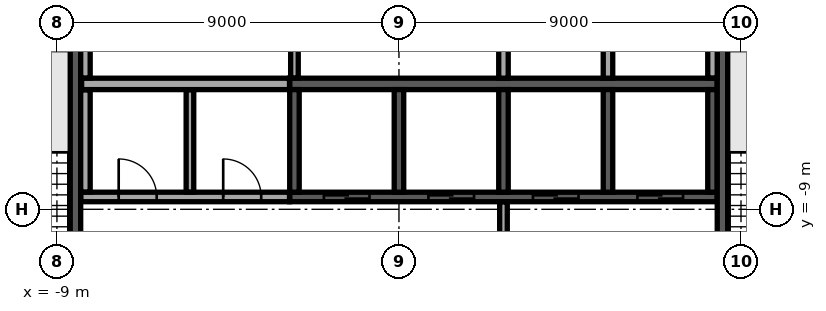
"""IFC4 building model, lengths in metres.
Left out: names, types, materials, properties, quantities, classifications, styles, units other than length and angle.
Written with IfcOpenShell. Run it as: python <this file> out.ifc"""

import sys

from ifc_helpers import new_model, si_unit, direction, frame, frame_2d, origin, place, context, subcontext, project, spatial, rectangle, extrude, element, fill, save


model = new_model("IFC4")
c1 = context("Model", 3, precision=1e-05, world=origin(), true_north=direction((0.0, 1.0)))
c2 = subcontext(c1, "Body", "Model", "MODEL_VIEW")
j1 = project(units=[si_unit("LENGTHUNIT", "METRE"), si_unit("PLANEANGLEUNIT", "RADIAN")], contexts=[c1])
p1 = place(None, origin())
s1 = spatial("IfcSite", under=j1, at=p1, CompositionType="ELEMENT")
p2 = place(p1, origin())
s2 = spatial("IfcBuilding", under=s1, at=p2, CompositionType="ELEMENT")
p3 = place(p2, frame((0.0, 0.0, 254.9)))
s3 = spatial("IfcBuildingStorey", under=s2, at=p3, CompositionType="ELEMENT", Elevation=254.9)
p4 = place(p3, frame((-2.875, -5.7, 0.0), z_axis=(0.0, 0.0, 1.0), x_axis=(1.0, 0.0, 0.0)))
e1 = element("IfcWall", 1, at=p4, inside=s3, PredefinedType="SOLIDWALL", context=c2, shape_type="SweptSolid", body=[
    extrude(rectangle(XDim=11.25, YDim=0.3, at=frame_2d((5.625, 0.0))), origin(), (0.0, 0.0, 1.0), 3.64),
])
for number, where, z_axis, x_axis in (
    (2, (2.75, -5.55, 0.0), (0.0, 0.0, 1.0), (0.0, 1.0, 0.0)),
    (3, (5.5, -5.55, 0.0), (0.0, 0.0, 1.0), (0.0, 1.0, 0.0)),
):
    element("IfcWall", number, at=place(p3, frame(where, z_axis=z_axis, x_axis=x_axis)), inside=s3, PredefinedType="SOLIDWALL", context=c2, shape_type="SweptSolid", body=[
        extrude(rectangle(XDim=2.7, YDim=0.25, at=frame_2d((1.35, 0.0))), origin(), (0.0, 0.0, 1.0), 3.64),
    ])
p5 = place(p3, frame((-2.875, -8.675, 0.0), z_axis=(0.0, 0.0, 1.0), x_axis=(1.0, 0.0, 0.0)))
e4 = element("IfcWall", 4, at=p5, inside=s3, PredefinedType="SOLIDWALL", context=c2, shape_type="SweptSolid", body=[
    extrude(rectangle(XDim=11.25, YDim=0.25, at=frame_2d((5.625, 0.0))), origin(), (0.0, 0.0, 1.0), 3.64),
])
p6 = place(p5, frame((0.9, 0.0, 0.0)))
e5 = element("IfcOpeningElement", 5, at=p6, cuts=e4, PredefinedType="OPENING", context=c2, shape_type="SweptSolid", body=[
    extrude(rectangle(XDim=1.2, YDim=2.1, at=frame_2d((0.6, 1.05))), frame((0.0, 0.135, 0.0), z_axis=(0.0, -1.0, 0.0), x_axis=(1.0, 0.0, 0.0)), (0.0, 0.0, 1.0), 0.27),
])
p7 = place(p5, frame((3.65, 0.0, 0.0)))
e6 = element("IfcOpeningElement", 6, at=p7, cuts=e4, PredefinedType="OPENING", context=c2, shape_type="SweptSolid", body=[
    extrude(rectangle(XDim=1.2, YDim=2.1, at=frame_2d((0.6, 1.05))), frame((0.0, 0.135, 0.0), z_axis=(0.0, -1.0, 0.0), x_axis=(1.0, 0.0, 0.0)), (0.0, 0.0, 1.0), 0.27),
])
p8 = place(p5, frame((6.4, 0.0, 0.0)))
e7 = element("IfcOpeningElement", 7, at=p8, cuts=e4, PredefinedType="OPENING", context=c2, shape_type="SweptSolid", body=[
    extrude(rectangle(XDim=1.2, YDim=2.1, at=frame_2d((0.6, 1.05))), frame((0.0, 0.135, 0.0), z_axis=(0.0, -1.0, 0.0), x_axis=(1.0, 0.0, 0.0)), (0.0, 0.0, 1.0), 0.27),
])
p9 = place(p5, frame((9.15, 0.0, 0.0)))
e8 = element("IfcOpeningElement", 8, at=p9, cuts=e4, PredefinedType="OPENING", context=c2, shape_type="SweptSolid", body=[
    extrude(rectangle(XDim=1.2, YDim=2.1, at=frame_2d((0.6, 1.05))), frame((0.0, 0.135, 0.0), z_axis=(0.0, -1.0, 0.0), x_axis=(1.0, 0.0, 0.0)), (0.0, 0.0, 1.0), 0.27),
])
for number, where, z_axis, x_axis in (
    (9, (-2.75, -8.55, 0.0), (0.0, 0.0, 1.0), (0.0, 1.0, 0.0)),
    (10, (0.0, -8.55, 0.0), (0.0, 0.0, 1.0), (0.0, 1.0, 0.0)),
    (11, (2.75, -8.55, 0.0), (0.0, 0.0, 1.0), (0.0, 1.0, 0.0)),
    (12, (5.5, -8.55, 0.0), (0.0, 0.0, 1.0), (0.0, 1.0, 0.0)),
    (13, (8.25, -8.55, 0.0), (0.0, 0.0, 1.0), (0.0, 1.0, 0.0)),
):
    element("IfcWall", number, at=place(p3, frame(where, z_axis=z_axis, x_axis=x_axis)), inside=s3, PredefinedType="SOLIDWALL", context=c2, shape_type="SweptSolid", body=[
        extrude(rectangle(XDim=2.7, YDim=0.25, at=frame_2d((1.35, 0.0))), origin(), (0.0, 0.0, 1.0), 3.64),
    ])
p10 = place(p3, frame((-8.512, -4.55, 0.0), z_axis=(0.0, 0.0, 1.0), x_axis=(0.0, -1.0, 0.0)))
e14 = element("IfcWall", 14, at=p10, inside=s3, PredefinedType="SOLIDWALL", context=c2, shape_type="SweptSolid", body=[
    extrude(rectangle(XDim=7.25, YDim=0.275, at=frame_2d((3.625, 0.0))), origin(), (0.0, 0.0, 1.0), 3.64),
])
p11 = place(p10, frame((6.0, 0.0, 0.0)))
e15 = element("IfcOpeningElement", 15, at=p11, cuts=e14, PredefinedType="OPENING", context=c2, shape_type="SweptSolid", body=[
    extrude(rectangle(XDim=1.0, YDim=2.1, at=frame_2d((0.5, 1.05))), frame((0.0, 0.147, 0.0), z_axis=(0.0, -1.0, 0.0), x_axis=(1.0, 0.0, 0.0)), (0.0, 0.0, 1.0), 0.295),
])
p12 = place(p3, frame((8.512, -4.55, 0.0), z_axis=(0.0, 0.0, 1.0), x_axis=(0.0, -1.0, 0.0)))
e16 = element("IfcWall", 16, at=p12, inside=s3, PredefinedType="SOLIDWALL", context=c2, shape_type="SweptSolid", body=[
    extrude(rectangle(XDim=7.25, YDim=0.275, at=frame_2d((3.625, 0.0))), origin(), (0.0, 0.0, 1.0), 3.64),
])
p13 = place(p12, frame((6.0, 0.0, 0.0)))
e17 = element("IfcOpeningElement", 17, at=p13, cuts=e16, PredefinedType="OPENING", context=c2, shape_type="SweptSolid", body=[
    extrude(rectangle(XDim=1.0, YDim=2.1, at=frame_2d((0.5, 1.05))), frame((0.0, 0.147, 0.0), z_axis=(0.0, -1.0, 0.0), x_axis=(1.0, 0.0, 0.0)), (0.0, 0.0, 1.0), 0.295),
])
p14 = place(p3, frame((2.75, -11.795, 0.0), z_axis=(0.0, 0.0, 1.0), x_axis=(0.0, 1.0, 0.0)))
e18 = element("IfcWall", 18, at=p14, inside=s3, PredefinedType="PARTITIONING", context=c2, shape_type="SweptSolid", body=[
    extrude(rectangle(XDim=2.99, YDim=0.2, at=frame_2d((1.495, 0.0))), origin(), (0.0, 0.0, 1.0), 3.64),
])
p15 = place(p3, frame((-8.37, -8.675, 0.0), z_axis=(0.0, 0.0, 1.0), x_axis=(1.0, 0.0, 0.0)))
e19 = element("IfcWall", 19, at=p15, inside=s3, PredefinedType="PARTITIONING", context=c2, shape_type="SweptSolid", body=[
    extrude(rectangle(XDim=5.49, YDim=0.25, at=frame_2d((2.745, 0.0))), origin(), (0.0, 0.0, 1.0), 3.64),
])
p16 = place(p15, frame((0.995, 0.0, 0.0)))
e20 = element("IfcOpeningElement", 20, at=p16, cuts=e19, PredefinedType="OPENING", context=c2, shape_type="SweptSolid", body=[
    extrude(rectangle(XDim=1.0, YDim=2.1, at=frame_2d((0.5, 1.05))), frame((0.0, 0.135, 0.0), z_axis=(0.0, -1.0, 0.0), x_axis=(1.0, 0.0, 0.0)), (0.0, 0.0, 1.0), 0.27),
])
p17 = place(p15, frame((3.745, 0.0, 0.0)))
e21 = element("IfcOpeningElement", 21, at=p17, cuts=e19, PredefinedType="OPENING", context=c2, shape_type="SweptSolid", body=[
    extrude(rectangle(XDim=1.0, YDim=2.1, at=frame_2d((0.5, 1.05))), frame((0.0, 0.135, 0.0), z_axis=(0.0, -1.0, 0.0), x_axis=(1.0, 0.0, 0.0)), (0.0, 0.0, 1.0), 0.27),
])
p18 = place(p3, frame((-8.25, -8.545, 0.0), z_axis=(0.0, 0.0, 1.0), x_axis=(0.0, 1.0, 0.0)))
e22 = element("IfcWall", 22, at=p18, inside=s3, PredefinedType="PARTITIONING", context=c2, shape_type="SweptSolid", body=[
    extrude(rectangle(XDim=2.69, YDim=0.25, at=frame_2d((1.345, 0.0))), origin(), (0.0, 0.0, 1.0), 3.64),
])
p19 = place(p3, frame((-5.5, -8.545, 0.0), z_axis=(0.0, 0.0, 1.0), x_axis=(0.0, 1.0, 0.0)))
e23 = element("IfcWall", 23, at=p19, inside=s3, PredefinedType="PARTITIONING", context=c2, shape_type="SweptSolid", body=[
    extrude(rectangle(XDim=2.69, YDim=0.2, at=frame_2d((1.345, 0.0))), origin(), (0.0, 0.0, 1.0), 3.64),
])
p20 = place(p3, frame((-8.35, -5.7, 0.0), z_axis=(0.0, 0.0, 1.0), x_axis=(1.0, 0.0, 0.0)))
e24 = element("IfcWall", 24, at=p20, inside=s3, PredefinedType="PARTITIONING", context=c2, shape_type="SweptSolid", body=[
    extrude(rectangle(XDim=5.47, YDim=0.3, at=frame_2d((2.735, 0.0))), origin(), (0.0, 0.0, 1.0), 3.64),
])
p21 = place(p3, frame((-8.25, -5.545, 0.0), z_axis=(0.0, 0.0, 1.0), x_axis=(0.0, 1.0, 0.0)))
e25 = element("IfcWall", 25, at=p21, inside=s3, PredefinedType="PARTITIONING", context=c2, shape_type="SweptSolid", body=[
    extrude(rectangle(XDim=2.69, YDim=0.25, at=frame_2d((1.345, 0.0))), origin(), (0.0, 0.0, 1.0), 3.64),
])
p22 = place(p3, frame((-2.75, -5.545, 0.0), z_axis=(0.0, 0.0, 1.0), x_axis=(0.0, 1.0, 0.0)))
e26 = element("IfcWall", 26, at=p22, inside=s3, PredefinedType="PARTITIONING", context=c2, shape_type="SweptSolid", body=[
    extrude(rectangle(XDim=2.69, YDim=0.2, at=frame_2d((1.345, 0.0))), origin(), (0.0, 0.0, 1.0), 3.64),
])
p23 = place(p3, frame((8.25, -5.545, 0.0), z_axis=(0.0, 0.0, 1.0), x_axis=(0.0, 1.0, 0.0)))
e27 = element("IfcWall", 27, at=p23, inside=s3, PredefinedType="PARTITIONING", context=c2, shape_type="SweptSolid", body=[
    extrude(rectangle(XDim=2.69, YDim=0.25, at=frame_2d((1.345, 0.0))), origin(), (0.0, 0.0, 1.0), 3.64),
])
p24 = place(p3, frame((-6.281, 33.292, 0.0), z_axis=(0.0, 0.0, 1.0), x_axis=(-0.544637268583, -0.838671715077, 0.0)))
e28 = element("IfcWall", 28, at=p24, inside=s3, PredefinedType="STANDARD", context=c2, shape_type="SweptSolid", body=[
    extrude(rectangle(XDim=48.843, YDim=0.6, at=frame_2d((24.422, 0.0))), origin(), (0.0, 0.0, 1.0), 3.64),
])
p25 = place(p24, frame((1.22, 0.0, 0.9)))
e29 = element("IfcOpeningElement", 29, at=p25, cuts=e28, PredefinedType="OPENING", context=c2, shape_type="SweptSolid", body=[
    extrude(rectangle(XDim=2.0, YDim=2.1, at=frame_2d((1.0, 1.05))), frame((0.0, 0.31, 0.0), z_axis=(0.0, -1.0, 0.0), x_axis=(1.0, 0.0, 0.0)), (0.0, 0.0, 1.0), 0.62),
])
p26 = place(p24, frame((5.66, 0.0, 0.9)))
e30 = element("IfcOpeningElement", 30, at=p26, cuts=e28, PredefinedType="OPENING", context=c2, shape_type="SweptSolid", body=[
    extrude(rectangle(XDim=2.0, YDim=2.1, at=frame_2d((1.0, 1.05))), frame((0.0, 0.31, 0.0), z_axis=(0.0, -1.0, 0.0), x_axis=(1.0, 0.0, 0.0)), (0.0, 0.0, 1.0), 0.62),
])
p27 = place(p24, frame((14.541, 0.0, 0.9)))
e31 = element("IfcOpeningElement", 31, at=p27, cuts=e28, PredefinedType="OPENING", context=c2, shape_type="SweptSolid", body=[
    extrude(rectangle(XDim=2.0, YDim=2.1, at=frame_2d((1.0, 1.05))), frame((0.0, 0.31, 0.0), z_axis=(0.0, -1.0, 0.0), x_axis=(1.0, 0.0, 0.0)), (0.0, 0.0, 1.0), 0.62),
])
p28 = place(p24, frame((18.981, 0.0, 0.9)))
e32 = element("IfcOpeningElement", 32, at=p28, cuts=e28, PredefinedType="OPENING", context=c2, shape_type="SweptSolid", body=[
    extrude(rectangle(XDim=2.0, YDim=2.1, at=frame_2d((1.0, 1.05))), frame((0.0, 0.31, 0.0), z_axis=(0.0, -1.0, 0.0), x_axis=(1.0, 0.0, 0.0)), (0.0, 0.0, 1.0), 0.62),
])
p29 = place(p24, frame((23.422, 0.0, 0.9)))
e33 = element("IfcOpeningElement", 33, at=p29, cuts=e28, PredefinedType="OPENING", context=c2, shape_type="SweptSolid", body=[
    extrude(rectangle(XDim=2.0, YDim=2.1, at=frame_2d((1.0, 1.05))), frame((0.0, 0.31, 0.0), z_axis=(0.0, -1.0, 0.0), x_axis=(1.0, 0.0, 0.0)), (0.0, 0.0, 1.0), 0.62),
])
p30 = place(p24, frame((27.862, 0.0, 0.9)))
e34 = element("IfcOpeningElement", 34, at=p30, cuts=e28, PredefinedType="OPENING", context=c2, shape_type="SweptSolid", body=[
    extrude(rectangle(XDim=2.0, YDim=2.1, at=frame_2d((1.0, 1.05))), frame((0.0, 0.31, 0.0), z_axis=(0.0, -1.0, 0.0), x_axis=(1.0, 0.0, 0.0)), (0.0, 0.0, 1.0), 0.62),
])
p31 = place(p24, frame((32.302, 0.0, 0.9)))
e35 = element("IfcOpeningElement", 35, at=p31, cuts=e28, PredefinedType="OPENING", context=c2, shape_type="SweptSolid", body=[
    extrude(rectangle(XDim=2.0, YDim=2.1, at=frame_2d((1.0, 1.05))), frame((0.0, 0.31, 0.0), z_axis=(0.0, -1.0, 0.0), x_axis=(1.0, 0.0, 0.0)), (0.0, 0.0, 1.0), 0.62),
])
p32 = place(p24, frame((36.742, 0.0, 0.9)))
e36 = element("IfcOpeningElement", 36, at=p32, cuts=e28, PredefinedType="OPENING", context=c2, shape_type="SweptSolid", body=[
    extrude(rectangle(XDim=2.0, YDim=2.1, at=frame_2d((1.0, 1.05))), frame((0.0, 0.31, 0.0), z_axis=(0.0, -1.0, 0.0), x_axis=(1.0, 0.0, 0.0)), (0.0, 0.0, 1.0), 0.62),
])
p33 = place(p24, frame((41.183, 0.0, 0.9)))
e37 = element("IfcOpeningElement", 37, at=p33, cuts=e28, PredefinedType="OPENING", context=c2, shape_type="SweptSolid", body=[
    extrude(rectangle(XDim=2.0, YDim=2.1, at=frame_2d((1.0, 1.05))), frame((0.0, 0.31, 0.0), z_axis=(0.0, -1.0, 0.0), x_axis=(1.0, 0.0, 0.0)), (0.0, 0.0, 1.0), 0.62),
])
p34 = place(p24, frame((45.623, 0.0, 0.9)))
e38 = element("IfcOpeningElement", 38, at=p34, cuts=e28, PredefinedType="OPENING", context=c2, shape_type="SweptSolid", body=[
    extrude(rectangle(XDim=2.0, YDim=2.1, at=frame_2d((1.0, 1.05))), frame((0.0, 0.31, 0.0), z_axis=(0.0, -1.0, 0.0), x_axis=(1.0, 0.0, 0.0)), (0.0, 0.0, 1.0), 0.62),
])
p35 = place(p3, frame((6.367, -33.16, 0.0), z_axis=(0.0, 0.0, 1.0), x_axis=(0.544637371147, 0.838671648472, 0.0)))
e39 = element("IfcWall", 39, at=p35, inside=s3, PredefinedType="STANDARD", context=c2, shape_type="SweptSolid", body=[
    extrude(rectangle(XDim=48.686, YDim=0.6, at=frame_2d((24.343, 0.0))), origin(), (0.0, 0.0, 1.0), 3.64),
])
p36 = place(p35, frame((1.213, 0.0, 0.9)))
e40 = element("IfcOpeningElement", 40, at=p36, cuts=e39, PredefinedType="OPENING", context=c2, shape_type="SweptSolid", body=[
    extrude(rectangle(XDim=2.0, YDim=2.1, at=frame_2d((1.0, 1.05))), frame((0.0, 0.31, 0.0), z_axis=(0.0, -1.0, 0.0), x_axis=(1.0, 0.0, 0.0)), (0.0, 0.0, 1.0), 0.62),
])
p37 = place(p35, frame((5.639, 0.0, 0.9)))
e41 = element("IfcOpeningElement", 41, at=p37, cuts=e39, PredefinedType="OPENING", context=c2, shape_type="SweptSolid", body=[
    extrude(rectangle(XDim=2.0, YDim=2.1, at=frame_2d((1.0, 1.05))), frame((0.0, 0.31, 0.0), z_axis=(0.0, -1.0, 0.0), x_axis=(1.0, 0.0, 0.0)), (0.0, 0.0, 1.0), 0.62),
])
p38 = place(p35, frame((14.491, 0.0, 0.9)))
e42 = element("IfcOpeningElement", 42, at=p38, cuts=e39, PredefinedType="OPENING", context=c2, shape_type="SweptSolid", body=[
    extrude(rectangle(XDim=2.0, YDim=2.1, at=frame_2d((1.0, 1.05))), frame((0.0, 0.31, 0.0), z_axis=(0.0, -1.0, 0.0), x_axis=(1.0, 0.0, 0.0)), (0.0, 0.0, 1.0), 0.62),
])
p39 = place(p35, frame((18.917, 0.0, 0.9)))
e43 = element("IfcOpeningElement", 43, at=p39, cuts=e39, PredefinedType="OPENING", context=c2, shape_type="SweptSolid", body=[
    extrude(rectangle(XDim=2.0, YDim=2.1, at=frame_2d((1.0, 1.05))), frame((0.0, 0.31, 0.0), z_axis=(0.0, -1.0, 0.0), x_axis=(1.0, 0.0, 0.0)), (0.0, 0.0, 1.0), 0.62),
])
p40 = place(p35, frame((23.343, 0.0, 0.9)))
e44 = element("IfcOpeningElement", 44, at=p40, cuts=e39, PredefinedType="OPENING", context=c2, shape_type="SweptSolid", body=[
    extrude(rectangle(XDim=2.0, YDim=2.1, at=frame_2d((1.0, 1.05))), frame((0.0, 0.31, 0.0), z_axis=(0.0, -1.0, 0.0), x_axis=(1.0, 0.0, 0.0)), (0.0, 0.0, 1.0), 0.62),
])
p41 = place(p35, frame((27.769, 0.0, 0.9)))
e45 = element("IfcOpeningElement", 45, at=p41, cuts=e39, PredefinedType="OPENING", context=c2, shape_type="SweptSolid", body=[
    extrude(rectangle(XDim=2.0, YDim=2.1, at=frame_2d((1.0, 1.05))), frame((0.0, 0.31, 0.0), z_axis=(0.0, -1.0, 0.0), x_axis=(1.0, 0.0, 0.0)), (0.0, 0.0, 1.0), 0.62),
])
p42 = place(p35, frame((32.195, 0.0, 0.9)))
e46 = element("IfcOpeningElement", 46, at=p42, cuts=e39, PredefinedType="OPENING", context=c2, shape_type="SweptSolid", body=[
    extrude(rectangle(XDim=2.0, YDim=2.1, at=frame_2d((1.0, 1.05))), frame((0.0, 0.31, 0.0), z_axis=(0.0, -1.0, 0.0), x_axis=(1.0, 0.0, 0.0)), (0.0, 0.0, 1.0), 0.62),
])
p43 = place(p35, frame((36.621, 0.0, 0.9)))
e47 = element("IfcOpeningElement", 47, at=p43, cuts=e39, PredefinedType="OPENING", context=c2, shape_type="SweptSolid", body=[
    extrude(rectangle(XDim=2.0, YDim=2.1, at=frame_2d((1.0, 1.05))), frame((0.0, 0.31, 0.0), z_axis=(0.0, -1.0, 0.0), x_axis=(1.0, 0.0, 0.0)), (0.0, 0.0, 1.0), 0.62),
])
p44 = place(p35, frame((41.047, 0.0, 0.9)))
e48 = element("IfcOpeningElement", 48, at=p44, cuts=e39, PredefinedType="OPENING", context=c2, shape_type="SweptSolid", body=[
    extrude(rectangle(XDim=2.0, YDim=2.1, at=frame_2d((1.0, 1.05))), frame((0.0, 0.31, 0.0), z_axis=(0.0, -1.0, 0.0), x_axis=(1.0, 0.0, 0.0)), (0.0, 0.0, 1.0), 0.62),
])
p45 = place(p35, frame((45.473, 0.0, 0.9)))
e49 = element("IfcOpeningElement", 49, at=p45, cuts=e39, PredefinedType="OPENING", context=c2, shape_type="SweptSolid", body=[
    extrude(rectangle(XDim=2.0, YDim=2.1, at=frame_2d((1.0, 1.05))), frame((0.0, 0.31, 0.0), z_axis=(0.0, -1.0, 0.0), x_axis=(1.0, 0.0, 0.0)), (0.0, 0.0, 1.0), 0.62),
])
p46 = place(p3, frame((-26.791, -5.221, 0.0), z_axis=(0.0, 0.0, 1.0), x_axis=(0.838671905754, -0.544636974965, 0.0)))
e50 = element("IfcWall", 50, at=p46, inside=s3, PredefinedType="PARTITIONING", context=c2, shape_type="SweptSolid", body=[
    extrude(rectangle(XDim=39.325, YDim=0.15, at=frame_2d((19.663, 0.0))), origin(), (0.0, 0.0, 1.0), 3.04),
])
p47 = place(p46, frame((2.05, 0.0, 0.0)))
e51 = element("IfcOpeningElement", 51, at=p47, cuts=e50, PredefinedType="OPENING", context=c2, shape_type="SweptSolid", body=[
    extrude(rectangle(XDim=1.0, YDim=2.1, at=frame_2d((0.5, 1.05))), frame((0.0, 0.085, 0.0), z_axis=(0.0, -1.0, 0.0), x_axis=(1.0, 0.0, 0.0)), (0.0, 0.0, 1.0), 0.17),
])
p48 = place(p46, frame((9.807, 0.0, 0.0)))
e52 = element("IfcOpeningElement", 52, at=p48, cuts=e50, PredefinedType="OPENING", context=c2, shape_type="SweptSolid", body=[
    extrude(rectangle(XDim=1.0, YDim=2.1, at=frame_2d((0.5, 1.05))), frame((0.0, 0.085, 0.0), z_axis=(0.0, -1.0, 0.0), x_axis=(1.0, 0.0, 0.0)), (0.0, 0.0, 1.0), 0.17),
])
p49 = place(p46, frame((18.866, 0.0, 0.0)))
e53 = element("IfcOpeningElement", 53, at=p49, cuts=e50, PredefinedType="OPENING", context=c2, shape_type="SweptSolid", body=[
    extrude(rectangle(XDim=1.0, YDim=2.1, at=frame_2d((0.5, 1.05))), frame((0.0, 0.085, 0.0), z_axis=(0.0, -1.0, 0.0), x_axis=(1.0, 0.0, 0.0)), (0.0, 0.0, 1.0), 0.17),
])
p50 = place(p46, frame((25.009, 0.0, 0.0)))
e54 = element("IfcOpeningElement", 54, at=p50, cuts=e50, PredefinedType="OPENING", context=c2, shape_type="SweptSolid", body=[
    extrude(rectangle(XDim=1.0, YDim=2.1, at=frame_2d((0.5, 1.05))), frame((0.0, 0.085, 0.0), z_axis=(0.0, -1.0, 0.0), x_axis=(1.0, 0.0, 0.0)), (0.0, 0.0, 1.0), 0.17),
])
p51 = place(p46, frame((36.069, 0.0, 0.0)))
e55 = element("IfcOpeningElement", 55, at=p51, cuts=e50, PredefinedType="OPENING", context=c2, shape_type="SweptSolid", body=[
    extrude(rectangle(XDim=1.8, YDim=2.1, at=frame_2d((0.9, 1.05))), frame((0.0, 0.085, 0.0), z_axis=(0.0, -1.0, 0.0), x_axis=(1.0, 0.0, 0.0)), (0.0, 0.0, 1.0), 0.17),
])
p52 = place(p6, origin())
e56 = element("IfcDoor", 56, at=p52, inside=s3, OperationType="DOUBLE_DOOR_SLIDING", PredefinedType="DOOR", context=c2, shape_type="SweptSolid", body=[
    extrude(rectangle(XDim=1.2, YDim=2.1, at=frame_2d((0.6, 1.05))), frame((0.0, 0.025, 0.0), z_axis=(0.0, -1.0, 0.0), x_axis=(1.0, 0.0, 0.0)), (0.0, 0.0, 1.0), 0.05),
])
fill(e5, e56)
p53 = place(p7, origin())
e57 = element("IfcDoor", 57, at=p53, inside=s3, OperationType="DOUBLE_DOOR_SLIDING", PredefinedType="DOOR", context=c2, shape_type="SweptSolid", body=[
    extrude(rectangle(XDim=1.2, YDim=2.1, at=frame_2d((0.6, 1.05))), frame((0.0, 0.025, 0.0), z_axis=(0.0, -1.0, 0.0), x_axis=(1.0, 0.0, 0.0)), (0.0, 0.0, 1.0), 0.05),
])
fill(e6, e57)
p54 = place(p8, origin())
e58 = element("IfcDoor", 58, at=p54, inside=s3, OperationType="DOUBLE_DOOR_SLIDING", PredefinedType="DOOR", context=c2, shape_type="SweptSolid", body=[
    extrude(rectangle(XDim=1.2, YDim=2.1, at=frame_2d((0.6, 1.05))), frame((0.0, 0.025, 0.0), z_axis=(0.0, -1.0, 0.0), x_axis=(1.0, 0.0, 0.0)), (0.0, 0.0, 1.0), 0.05),
])
fill(e7, e58)
p55 = place(p9, origin())
e59 = element("IfcDoor", 59, at=p55, inside=s3, OperationType="DOUBLE_DOOR_SLIDING", PredefinedType="DOOR", context=c2, shape_type="SweptSolid", body=[
    extrude(rectangle(XDim=1.2, YDim=2.1, at=frame_2d((0.6, 1.05))), frame((0.0, 0.025, 0.0), z_axis=(0.0, -1.0, 0.0), x_axis=(1.0, 0.0, 0.0)), (0.0, 0.0, 1.0), 0.05),
])
fill(e8, e59)
p56 = place(p16, origin())
e60 = element("IfcDoor", 60, at=p56, inside=s3, OperationType="SINGLE_SWING_LEFT", PredefinedType="DOOR", context=c2, shape_type="SweptSolid", body=[
    extrude(rectangle(XDim=1.0, YDim=2.1, at=frame_2d((0.5, 1.05))), frame((0.0, 0.025, 0.0), z_axis=(0.0, -1.0, 0.0), x_axis=(1.0, 0.0, 0.0)), (0.0, 0.0, 1.0), 0.05),
])
fill(e20, e60)
p57 = place(p17, origin())
e61 = element("IfcDoor", 61, at=p57, inside=s3, OperationType="SINGLE_SWING_LEFT", PredefinedType="DOOR", context=c2, shape_type="SweptSolid", body=[
    extrude(rectangle(XDim=1.0, YDim=2.1, at=frame_2d((0.5, 1.05))), frame((0.0, 0.025, 0.0), z_axis=(0.0, -1.0, 0.0), x_axis=(1.0, 0.0, 0.0)), (0.0, 0.0, 1.0), 0.05),
])
fill(e21, e61)
save(model, sys.argv[1])
